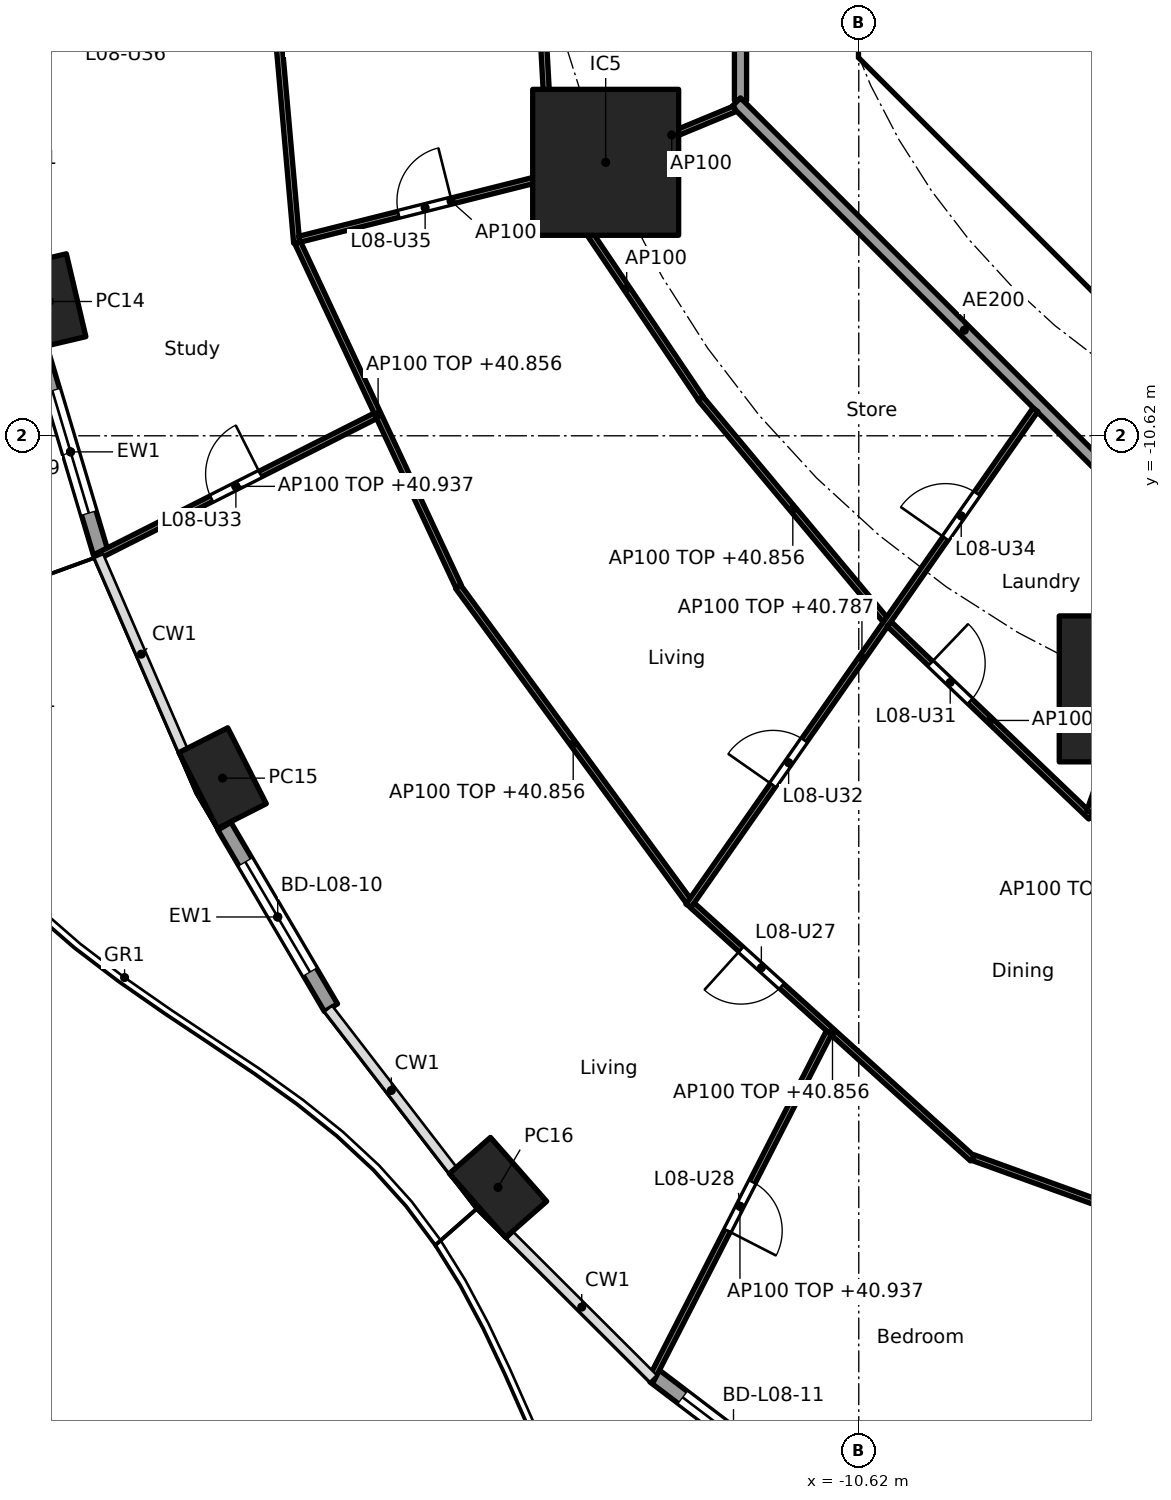
"""IFC4 building model, lengths in metres.
Left out: names, types, materials, properties, quantities, classifications, styles, units other than length and angle.
Written with IfcOpenShell. Run it as: python <this file> out.ifc"""

import sys

from ifc_helpers import new_model, si_unit, direction, frame, frame_2d, origin, origin_2d, place, context, subcontext, project, spatial, polyline, rectangle, hollow_rectangle, outline, extrude, element, fill, save


model = new_model("IFC4")
c1 = context("Model", 3, precision=1e-05, world=origin(), true_north=direction((0.0, 1.0)))
c2 = subcontext(c1, "Body", "Model", "MODEL_VIEW")
j1 = project(units=[si_unit("LENGTHUNIT", "METRE"), si_unit("PLANEANGLEUNIT", "RADIAN")], contexts=[c1])
p1 = place(None, origin())
s1 = spatial("IfcSite", under=j1, at=p1, CompositionType="ELEMENT")
p2 = place(p1, origin())
s2 = spatial("IfcBuilding", under=s1, at=p2, CompositionType="ELEMENT")
p3 = place(p2, frame((0.0, 0.0, 38.1)))
s3 = spatial("IfcBuildingStorey", under=s2, at=p3, CompositionType="ELEMENT", Elevation=38.1)
for number, where, z_axis, x_axis in (
    (1, (-23.929, -8.412, 0.0), (0.0, 0.0, 1.0), (0.229, -0.973, 0.0)),
    (2, (-21.082, -16.25, 0.0), (0.0, 0.0, 1.0), (0.452, -0.892, 0.0)),
    (3, (-16.552, -22.981, 0.0), (0.0, 0.0, 1.0), (0.66, -0.751, 0.0)),
):
    element("IfcColumn", number, at=place(p3, frame(where, z_axis=z_axis, x_axis=x_axis)), inside=s3, PredefinedType="COLUMN", context=c2, shape_type="SweptSolid", body=[
        extrude(hollow_rectangle(XDim=1.4, YDim=0.9, WallThickness=0.05, at=origin_2d()), origin(), (0.0, 0.0, 1.0), 3.7),
    ])
for number, where, z_axis, x_axis in (
    (4, (-14.782, -6.123, 0.0), (0.0, 0.0, 1.0), (1.0, 0.0, 0.0)),
    (5, (-6.123, -14.782, 0.0), (0.0, 0.0, 1.0), (1.0, 0.0, 0.0)),
):
    element("IfcColumn", number, at=place(p3, frame(where, z_axis=z_axis, x_axis=x_axis)), inside=s3, PredefinedType="COLUMN", context=c2, shape_type="SweptSolid", body=[
        extrude(rectangle(XDim=2.4, YDim=2.4, at=origin_2d()), origin(), (0.0, 0.0, 1.0), 3.7),
    ])
p4 = place(p3, frame((-23.073, -12.593, 0.0), z_axis=(0.0, 0.0, 1.0), x_axis=(-0.285871309426, 0.958268018065, 0.0)))
e6 = element("IfcWall", 6, at=p4, inside=s3, PredefinedType="SOLIDWALL", context=c2, shape_type="SweptSolid", body=[
    extrude(rectangle(XDim=3.565, YDim=0.25, at=frame_2d((1.783, 0.0))), origin(), (0.0, 0.0, 1.0), 3.44),
])
p5 = place(p4, frame((0.733, 0.0, 0.0)))
e7 = element("IfcOpeningElement", 7, at=p5, cuts=e6, PredefinedType="OPENING", context=c2, shape_type="SweptSolid", body=[
    extrude(rectangle(XDim=2.1, YDim=2.4, at=frame_2d((1.05, 1.2))), frame((0.0, 0.135, 0.0), z_axis=(0.0, -1.0, 0.0), x_axis=(1.0, 0.0, 0.0)), (0.0, 0.0, 1.0), 0.27),
])
p6 = place(p3, frame((-19.3, -20.026, 0.0), z_axis=(0.0, 0.0, 1.0), x_axis=(-0.506311160839, 0.862350861546, 0.0)))
e8 = element("IfcWall", 8, at=p6, inside=s3, PredefinedType="SOLIDWALL", context=c2, shape_type="SweptSolid", body=[
    extrude(rectangle(XDim=3.462, YDim=0.25, at=frame_2d((1.731, 0.0))), origin(), (0.0, 0.0, 1.0), 3.44),
])
p7 = place(p6, frame((0.681, 0.0, 0.0)))
e9 = element("IfcOpeningElement", 9, at=p7, cuts=e8, PredefinedType="OPENING", context=c2, shape_type="SweptSolid", body=[
    extrude(rectangle(XDim=2.1, YDim=2.4, at=frame_2d((1.05, 1.2))), frame((0.0, 0.135, 0.0), z_axis=(0.0, -1.0, 0.0), x_axis=(1.0, 0.0, 0.0)), (0.0, 0.0, 1.0), 0.27),
])
p8 = place(p3, frame((-11.382, -28.056, 0.0), z_axis=(0.0, 0.0, 1.0), x_axis=(-0.796022293214, 0.605267303517, 0.0)))
e10 = element("IfcWall", 10, at=p8, inside=s3, PredefinedType="SOLIDWALL", context=c2, shape_type="SweptSolid", body=[
    extrude(rectangle(XDim=3.262, YDim=0.25, at=frame_2d((1.631, 0.0))), origin(), (0.0, 0.0, 1.0), 3.44),
])
p9 = place(p8, frame((0.581, 0.0, 0.0)))
e11 = element("IfcOpeningElement", 11, at=p9, cuts=e10, PredefinedType="OPENING", context=c2, shape_type="SweptSolid", body=[
    extrude(rectangle(XDim=2.1, YDim=2.4, at=frame_2d((1.05, 1.2))), frame((0.0, 0.135, 0.0), z_axis=(0.0, -1.0, 0.0), x_axis=(1.0, 0.0, 0.0)), (0.0, 0.0, 1.0), 0.27),
])
p10 = place(p3, frame((-9.988, -4.613, 0.0), z_axis=(0.0, 0.0, 1.0), x_axis=(0.707106781187, -0.707106781187, 0.0)))
e12 = element("IfcWall", 12, at=p10, inside=s3, PredefinedType="SHEAR", context=c2, shape_type="SweptSolid", body=[
    extrude(rectangle(XDim=7.602, YDim=0.6, at=frame_2d((3.801, 0.0))), origin(), (0.0, 0.0, 1.0), 3.44),
])
p11 = place(p10, frame((6.151, 0.0, 0.0)))
e13 = element("IfcOpeningElement", 13, at=p11, cuts=e12, PredefinedType="OPENING", context=c2, shape_type="SweptSolid", body=[
    extrude(rectangle(XDim=1.1, YDim=2.1, at=frame_2d((0.55, 1.05))), frame((0.0, 0.31, 0.0), z_axis=(0.0, -1.0, 0.0), x_axis=(1.0, 0.0, 0.0)), (0.0, 0.0, 1.0), 0.62),
])
p12 = place(p3, origin())
e14 = element("IfcWall", 14, at=p12, inside=s3, PredefinedType="SHEAR", context=c2, shape_type="SweptSolid", body=[
    extrude(outline(polyline([(-10.625, -3.801), (-10.025, -3.801), (-10.025, -4.152), (-9.776, -4.401), (-10.2, -4.825), (-10.625, -4.401), (-10.625, -3.801)])), origin(), (0.0, 0.0, 1.0), 3.44),
])
p13 = place(p3, frame((-8.301, -5.8, 0.0), z_axis=(0.0, 0.0, 1.0), x_axis=(1.0, 0.0, 0.0)))
e15 = element("IfcWall", 15, at=p13, inside=s3, PredefinedType="PARTITIONING", context=c2, shape_type="SweptSolid", body=[
    extrude(rectangle(XDim=2.026, YDim=0.15, at=frame_2d((1.013, 0.0))), origin(), (0.0, 0.0, 1.0), 3.44),
])
p14 = place(p3, frame((-12.565, 5.304, 0.0), z_axis=(0.0, 0.0, 1.0), x_axis=(0.0, -1.0, 0.0)))
e16 = element("IfcWall", 16, at=p14, inside=s3, PredefinedType="PARTITIONING", context=c2, shape_type="SweptSolid", body=[
    extrude(rectangle(XDim=10.409, YDim=0.2, at=frame_2d((5.205, 0.0))), origin(), (0.0, 0.0, 1.0), 3.44),
])
p15 = place(p3, frame((-12.635, -5.134, 0.0), z_axis=(0.0, 0.0, 1.0), x_axis=(0.707106781187, -0.707106781187, 0.0)))
e17 = element("IfcWall", 17, at=p15, inside=s3, PredefinedType="PARTITIONING", context=c2, shape_type="SweptSolid", body=[
    extrude(rectangle(XDim=10.609, YDim=0.2, at=frame_2d((5.305, 0.0))), origin(), (0.0, 0.0, 1.0), 3.44),
])
p16 = place(p3, frame((-16.033, 0.05, 0.0), z_axis=(0.0, 0.0, 1.0), x_axis=(0.054634315779, -0.998506430395, 0.0)))
e18 = element("IfcWall", 18, at=p16, inside=s3, PredefinedType="PARTITIONING", context=c2, shape_type="SweptSolid", body=[
    extrude(rectangle(XDim=6.359, YDim=0.1, at=frame_2d((3.179, 0.0))), origin(), (0.0, 0.0, 1.0), 2.756),
])
p17 = place(p16, frame((2.754, 0.0, 0.0)))
e19 = element("IfcOpeningElement", 19, at=p17, cuts=e18, PredefinedType="OPENING", context=c2, shape_type="SweptSolid", body=[
    extrude(rectangle(XDim=0.9, YDim=2.1, at=frame_2d((0.45, 1.05))), frame((0.0, 0.06, 0.0), z_axis=(0.0, -1.0, 0.0), x_axis=(1.0, 0.0, 0.0)), (0.0, 0.0, 1.0), 0.12),
])
p18 = place(p3, frame((-20.527, 0.05, 0.0), z_axis=(0.0, 0.0, 1.0), x_axis=(0.088135127406, -0.996108527881, 0.0)))
e20 = element("IfcWall", 20, at=p18, inside=s3, PredefinedType="PARTITIONING", context=c2, shape_type="SweptSolid", body=[
    extrude(rectangle(XDim=7.529, YDim=0.1, at=frame_2d((3.765, 0.0))), origin(), (0.0, 0.0, 1.0), 2.756),
])
p19 = place(p3, frame((-20.245, -3.706, 0.0), z_axis=(0.0, 0.0, 1.0), x_axis=(-0.992575966227, -0.121626277047, 0.0)))
e21 = element("IfcWall", 21, at=p19, inside=s3, PredefinedType="PARTITIONING", context=c2, shape_type="SweptSolid", body=[
    extrude(rectangle(XDim=4.904, YDim=0.1, at=frame_2d((2.452, 0.0))), origin(), (0.0, 0.0, 1.0), 2.837),
])
p20 = place(p19, frame((2.002, 0.0, 0.0)))
e22 = element("IfcOpeningElement", 22, at=p20, cuts=e21, PredefinedType="OPENING", context=c2, shape_type="SweptSolid", body=[
    extrude(rectangle(XDim=0.9, YDim=2.1, at=frame_2d((0.45, 1.05))), frame((0.0, 0.06, 0.0), z_axis=(0.0, -1.0, 0.0), x_axis=(1.0, 0.0, 0.0)), (0.0, 0.0, 1.0), 0.12),
])
p21 = place(p3, frame((-12.657, -5.243, 0.0), z_axis=(0.0, 0.0, 1.0), x_axis=(-0.923864733477, -0.382719158442, 0.0)))
e23 = element("IfcWall", 23, at=p21, inside=s3, PredefinedType="PARTITIONING", context=c2, shape_type="SweptSolid", body=[
    extrude(rectangle(XDim=2.25, YDim=0.1, at=frame_2d((1.125, 0.0))), origin(), (0.0, 0.0, 1.0), 3.44),
])
p22 = place(p3, frame((-14.831, -6.135, 0.0), z_axis=(0.0, 0.0, 1.0), x_axis=(-0.96988230015, -0.243574062362, 0.0)))
e24 = element("IfcWall", 24, at=p22, inside=s3, PredefinedType="PARTITIONING", context=c2, shape_type="SweptSolid", body=[
    extrude(rectangle(XDim=5.144, YDim=0.1, at=frame_2d((2.572, 0.0))), origin(), (0.0, 0.0, 1.0), 3.44),
])
p23 = place(p22, frame((2.561, 0.0, 0.0)))
e25 = element("IfcOpeningElement", 25, at=p23, cuts=e24, PredefinedType="OPENING", context=c2, shape_type="SweptSolid", body=[
    extrude(rectangle(XDim=0.9, YDim=2.1, at=frame_2d((0.45, 1.05))), frame((0.0, 0.06, 0.0), z_axis=(0.0, -1.0, 0.0), x_axis=(1.0, 0.0, 0.0)), (0.0, 0.0, 1.0), 0.12),
])
p24 = place(p3, frame((-15.655, -6.391, 0.0), z_axis=(0.0, 0.0, 1.0), x_axis=(0.559126445155, -0.82908239538, 0.0)))
e26 = element("IfcWall", 26, at=p24, inside=s3, PredefinedType="PARTITIONING", context=c2, shape_type="SweptSolid", body=[
    extrude(rectangle(XDim=4.358, YDim=0.1, at=frame_2d((2.179, 0.0))), origin(), (0.0, 0.0, 1.0), 3.44),
])
p25 = place(p3, frame((-19.847, -7.445, 0.0), z_axis=(0.0, 0.0, 1.0), x_axis=(0.423892287987, -0.905712607942, 0.0)))
e27 = element("IfcWall", 27, at=p25, inside=s3, PredefinedType="PARTITIONING", context=c2, shape_type="SweptSolid", body=[
    extrude(rectangle(XDim=6.238, YDim=0.1, at=frame_2d((3.119, 0.0))), origin(), (0.0, 0.0, 1.0), 2.756),
])
p26 = place(p3, frame((-18.569, -10.292, 0.0), z_axis=(0.0, 0.0, 1.0), x_axis=(-0.892519131357, -0.451009534446, 0.0)))
e28 = element("IfcWall", 28, at=p26, inside=s3, PredefinedType="PARTITIONING", context=c2, shape_type="SweptSolid", body=[
    extrude(rectangle(XDim=5.14, YDim=0.1, at=frame_2d((2.57, 0.0))), origin(), (0.0, 0.0, 1.0), 2.837),
])
p27 = place(p26, frame((2.12, 0.0, 0.0)))
e29 = element("IfcOpeningElement", 29, at=p27, cuts=e28, PredefinedType="OPENING", context=c2, shape_type="SweptSolid", body=[
    extrude(rectangle(XDim=0.9, YDim=2.1, at=frame_2d((0.45, 1.05))), frame((0.0, 0.06, 0.0), z_axis=(0.0, -1.0, 0.0), x_axis=(1.0, 0.0, 0.0)), (0.0, 0.0, 1.0), 0.12),
])
p28 = place(p3, frame((-13.222, -10.007, 0.0), z_axis=(0.0, 0.0, 1.0), x_axis=(0.640807748916, -0.767701393075, 0.0)))
e30 = element("IfcWall", 30, at=p28, inside=s3, PredefinedType="PARTITIONING", context=c2, shape_type="SweptSolid", body=[
    extrude(rectangle(XDim=4.737, YDim=0.1, at=frame_2d((2.368, 0.0))), origin(), (0.0, 0.0, 1.0), 2.756),
])
p29 = place(p3, frame((-17.211, -13.1, 0.0), z_axis=(0.0, 0.0, 1.0), x_axis=(0.591206785834, -0.806520016109, 0.0)))
e31 = element("IfcWall", 31, at=p29, inside=s3, PredefinedType="PARTITIONING", context=c2, shape_type="SweptSolid", body=[
    extrude(rectangle(XDim=6.41, YDim=0.1, at=frame_2d((3.205, 0.0))), origin(), (0.0, 0.0, 1.0), 2.756),
])
p30 = place(p3, frame((-7.715, -10.193, 0.0), z_axis=(0.0, 0.0, 1.0), x_axis=(-0.573126502256, -0.819466907454, 0.0)))
e32 = element("IfcWall", 32, at=p30, inside=s3, PredefinedType="PARTITIONING", context=c2, shape_type="SweptSolid", body=[
    extrude(rectangle(XDim=9.954, YDim=0.1, at=frame_2d((4.977, 0.0))), origin(), (0.0, 0.0, 1.0), 2.687),
])
p31 = place(p30, frame((6.631, 0.0, 0.0)))
e33 = element("IfcOpeningElement", 33, at=p31, cuts=e32, PredefinedType="OPENING", context=c2, shape_type="SweptSolid", body=[
    extrude(rectangle(XDim=0.9, YDim=2.1, at=frame_2d((0.45, 1.05))), frame((0.0, 0.06, 0.0), z_axis=(0.0, -1.0, 0.0), x_axis=(1.0, 0.0, 0.0)), (0.0, 0.0, 1.0), 0.12),
])
p32 = place(p30, frame((1.678, 0.0, 0.0)))
e34 = element("IfcOpeningElement", 34, at=p32, cuts=e32, PredefinedType="OPENING", context=c2, shape_type="SweptSolid", body=[
    extrude(rectangle(XDim=0.9, YDim=2.1, at=frame_2d((0.45, 1.05))), frame((0.0, 0.06, 0.0), z_axis=(0.0, -1.0, 0.0), x_axis=(1.0, 0.0, 0.0)), (0.0, 0.0, 1.0), 0.12),
])
p33 = place(p3, frame((-10.119, -13.716, 0.0), z_axis=(0.0, 0.0, 1.0), x_axis=(0.722763212502, -0.69109575216, 0.0)))
e35 = element("IfcWall", 35, at=p33, inside=s3, PredefinedType="PARTITIONING", context=c2, shape_type="SweptSolid", body=[
    extrude(rectangle(XDim=4.587, YDim=0.1, at=frame_2d((2.293, 0.0))), origin(), (0.0, 0.0, 1.0), 2.756),
])
p34 = place(p33, frame((0.938, 0.0, 0.0)))
e36 = element("IfcOpeningElement", 36, at=p34, cuts=e35, PredefinedType="OPENING", context=c2, shape_type="SweptSolid", body=[
    extrude(rectangle(XDim=0.9, YDim=2.1, at=frame_2d((0.45, 1.05))), frame((0.0, 0.06, 0.0), z_axis=(0.0, -1.0, 0.0), x_axis=(1.0, 0.0, 0.0)), (0.0, 0.0, 1.0), 0.12),
])
p35 = place(p3, frame((-13.355, -18.343, 0.0), z_axis=(0.0, 0.0, 1.0), x_axis=(0.741720189244, -0.670709445936, 0.0)))
e37 = element("IfcWall", 37, at=p35, inside=s3, PredefinedType="PARTITIONING", context=c2, shape_type="SweptSolid", body=[
    extrude(rectangle(XDim=6.209, YDim=0.1, at=frame_2d((3.104, 0.0))), origin(), (0.0, 0.0, 1.0), 2.756),
])
p36 = place(p35, frame((1.077, 0.0, 0.0)))
e38 = element("IfcOpeningElement", 38, at=p36, cuts=e37, PredefinedType="OPENING", context=c2, shape_type="SweptSolid", body=[
    extrude(rectangle(XDim=0.9, YDim=2.1, at=frame_2d((0.45, 1.05))), frame((0.0, 0.06, 0.0), z_axis=(0.0, -1.0, 0.0), x_axis=(1.0, 0.0, 0.0)), (0.0, 0.0, 1.0), 0.12),
])
p37 = place(p3, frame((-11.112, -20.437, 0.0), z_axis=(0.0, 0.0, 1.0), x_axis=(-0.455901610863, -0.890030179945, 0.0)))
e39 = element("IfcWall", 39, at=p37, inside=s3, PredefinedType="PARTITIONING", context=c2, shape_type="SweptSolid", body=[
    extrude(rectangle(XDim=6.414, YDim=0.1, at=frame_2d((3.207, 0.0))), origin(), (0.0, 0.0, 1.0), 2.837),
])
p38 = place(p37, frame((2.757, 0.0, 0.0)))
e40 = element("IfcOpeningElement", 40, at=p38, cuts=e39, PredefinedType="OPENING", context=c2, shape_type="SweptSolid", body=[
    extrude(rectangle(XDim=0.9, YDim=2.1, at=frame_2d((0.45, 1.05))), frame((0.0, 0.06, 0.0), z_axis=(0.0, -1.0, 0.0), x_axis=(1.0, 0.0, 0.0)), (0.0, 0.0, 1.0), 0.12),
])
p39 = place(p3, frame((-6.139, -14.83, 0.0), z_axis=(0.0, 0.0, 1.0), x_axis=(-0.327246993321, -0.944938836837, 0.0)))
e41 = element("IfcWall", 41, at=p39, inside=s3, PredefinedType="PARTITIONING", context=c2, shape_type="SweptSolid", body=[
    extrude(rectangle(XDim=2.09, YDim=0.1, at=frame_2d((1.045, 0.0))), origin(), (0.0, 0.0, 1.0), 3.44),
])
p40 = place(p3, frame((-6.791, -16.862, 0.0), z_axis=(0.0, 0.0, 1.0), x_axis=(0.979581941859, -0.201045316246, 0.0)))
e42 = element("IfcWall", 42, at=p40, inside=s3, PredefinedType="PARTITIONING", context=c2, shape_type="SweptSolid", body=[
    extrude(rectangle(XDim=2.256, YDim=0.1, at=frame_2d((1.128, 0.0))), origin(), (0.0, 0.0, 1.0), 2.756),
])
p41 = place(p3, frame((-8.739, -22.491, 0.0), z_axis=(0.0, 0.0, 1.0), x_axis=(0.940401691072, -0.340065669288, 0.0)))
e43 = element("IfcWall", 43, at=p41, inside=s3, PredefinedType="PARTITIONING", context=c2, shape_type="SweptSolid", body=[
    extrude(rectangle(XDim=6.067, YDim=0.1, at=frame_2d((3.034, 0.0))), origin(), (0.0, 0.0, 1.0), 2.756),
])
p42 = place(p41, frame((4.05, 0.0, 0.0)))
e44 = element("IfcOpeningElement", 44, at=p42, cuts=e43, PredefinedType="OPENING", context=c2, shape_type="SweptSolid", body=[
    extrude(rectangle(XDim=0.9, YDim=2.1, at=frame_2d((0.45, 1.05))), frame((0.0, 0.06, 0.0), z_axis=(0.0, -1.0, 0.0), x_axis=(1.0, 0.0, 0.0)), (0.0, 0.0, 1.0), 0.12),
])
p43 = place(p3, frame((-3.492, -12.662, 0.0), z_axis=(0.0, 0.0, 1.0), x_axis=(-0.219268088006, -0.975664648115, 0.0)))
e45 = element("IfcWall", 45, at=p43, inside=s3, PredefinedType="PARTITIONING", context=c2, shape_type="SweptSolid", body=[
    extrude(rectangle(XDim=18.23, YDim=0.1, at=frame_2d((9.115, 0.0))), origin(), (0.0, 0.0, 1.0), 2.687),
])
p44 = place(p43, frame((0.35, 0.0, 0.0)))
e46 = element("IfcOpeningElement", 46, at=p44, cuts=e45, PredefinedType="OPENING", context=c2, shape_type="SweptSolid", body=[
    extrude(rectangle(XDim=0.9, YDim=2.1, at=frame_2d((0.45, 1.05))), frame((0.0, 0.06, 0.0), z_axis=(0.0, -1.0, 0.0), x_axis=(1.0, 0.0, 0.0)), (0.0, 0.0, 1.0), 0.12),
])
p45 = place(p43, frame((7.497, 0.0, 0.0)))
e47 = element("IfcOpeningElement", 47, at=p45, cuts=e45, PredefinedType="OPENING", context=c2, shape_type="SweptSolid", body=[
    extrude(rectangle(XDim=0.9, YDim=2.1, at=frame_2d((0.45, 1.05))), frame((0.0, 0.06, 0.0), z_axis=(0.0, -1.0, 0.0), x_axis=(1.0, 0.0, 0.0)), (0.0, 0.0, 1.0), 0.12),
])
p46 = place(p5, origin())
e48 = element("IfcDoor", 48, at=p46, inside=s3, OperationType="SLIDING_TO_LEFT", PredefinedType="DOOR", context=c2, shape_type="SweptSolid", body=[
    extrude(rectangle(XDim=2.1, YDim=2.4, at=frame_2d((1.05, 1.2))), frame((0.0, 0.025, 0.0), z_axis=(0.0, -1.0, 0.0), x_axis=(1.0, 0.0, 0.0)), (0.0, 0.0, 1.0), 0.05),
])
fill(e7, e48)
p47 = place(p7, origin())
e49 = element("IfcDoor", 49, at=p47, inside=s3, OperationType="SLIDING_TO_LEFT", PredefinedType="DOOR", context=c2, shape_type="SweptSolid", body=[
    extrude(rectangle(XDim=2.1, YDim=2.4, at=frame_2d((1.05, 1.2))), frame((0.0, 0.025, 0.0), z_axis=(0.0, -1.0, 0.0), x_axis=(1.0, 0.0, 0.0)), (0.0, 0.0, 1.0), 0.05),
])
fill(e9, e49)
p48 = place(p9, origin())
e50 = element("IfcDoor", 50, at=p48, inside=s3, OperationType="SLIDING_TO_LEFT", PredefinedType="DOOR", context=c2, shape_type="SweptSolid", body=[
    extrude(rectangle(XDim=2.1, YDim=2.4, at=frame_2d((1.05, 1.2))), frame((0.0, 0.025, 0.0), z_axis=(0.0, -1.0, 0.0), x_axis=(1.0, 0.0, 0.0)), (0.0, 0.0, 1.0), 0.05),
])
fill(e11, e50)
p49 = place(p36, frame((0.9, 0.0, 0.0), x_axis=(-1.0, 0.0, 0.0)))
e51 = element("IfcDoor", 51, at=p49, inside=s3, OperationType="SINGLE_SWING_RIGHT", PredefinedType="DOOR", context=c2, shape_type="SweptSolid", body=[
    extrude(rectangle(XDim=0.9, YDim=2.1, at=frame_2d((0.45, 1.05))), frame((0.0, 0.025, 0.0), z_axis=(0.0, -1.0, 0.0), x_axis=(1.0, 0.0, 0.0)), (0.0, 0.0, 1.0), 0.05),
])
fill(e38, e51)
p50 = place(p38, origin())
e52 = element("IfcDoor", 52, at=p50, inside=s3, OperationType="SINGLE_SWING_RIGHT", PredefinedType="DOOR", context=c2, shape_type="SweptSolid", body=[
    extrude(rectangle(XDim=0.9, YDim=2.1, at=frame_2d((0.45, 1.05))), frame((0.0, 0.025, 0.0), z_axis=(0.0, -1.0, 0.0), x_axis=(1.0, 0.0, 0.0)), (0.0, 0.0, 1.0), 0.05),
])
fill(e40, e52)
p51 = place(p34, origin())
e53 = element("IfcDoor", 53, at=p51, inside=s3, OperationType="SINGLE_SWING_LEFT", PredefinedType="DOOR", context=c2, shape_type="SweptSolid", body=[
    extrude(rectangle(XDim=0.9, YDim=2.1, at=frame_2d((0.45, 1.05))), frame((0.0, 0.025, 0.0), z_axis=(0.0, -1.0, 0.0), x_axis=(1.0, 0.0, 0.0)), (0.0, 0.0, 1.0), 0.05),
])
fill(e36, e53)
p52 = place(p31, frame((0.9, 0.0, 0.0), x_axis=(-1.0, 0.0, 0.0)))
e54 = element("IfcDoor", 54, at=p52, inside=s3, OperationType="SINGLE_SWING_LEFT", PredefinedType="DOOR", context=c2, shape_type="SweptSolid", body=[
    extrude(rectangle(XDim=0.9, YDim=2.1, at=frame_2d((0.45, 1.05))), frame((0.0, 0.025, 0.0), z_axis=(0.0, -1.0, 0.0), x_axis=(1.0, 0.0, 0.0)), (0.0, 0.0, 1.0), 0.05),
])
fill(e33, e54)
p53 = place(p27, frame((0.9, 0.0, 0.0), x_axis=(-1.0, 0.0, 0.0)))
e55 = element("IfcDoor", 55, at=p53, inside=s3, OperationType="SINGLE_SWING_RIGHT", PredefinedType="DOOR", context=c2, shape_type="SweptSolid", body=[
    extrude(rectangle(XDim=0.9, YDim=2.1, at=frame_2d((0.45, 1.05))), frame((0.0, 0.025, 0.0), z_axis=(0.0, -1.0, 0.0), x_axis=(1.0, 0.0, 0.0)), (0.0, 0.0, 1.0), 0.05),
])
fill(e29, e55)
p54 = place(p32, frame((0.9, 0.0, 0.0), x_axis=(-1.0, 0.0, 0.0)))
e56 = element("IfcDoor", 56, at=p54, inside=s3, OperationType="SINGLE_SWING_LEFT", PredefinedType="DOOR", context=c2, shape_type="SweptSolid", body=[
    extrude(rectangle(XDim=0.9, YDim=2.1, at=frame_2d((0.45, 1.05))), frame((0.0, 0.025, 0.0), z_axis=(0.0, -1.0, 0.0), x_axis=(1.0, 0.0, 0.0)), (0.0, 0.0, 1.0), 0.05),
])
fill(e34, e56)
p55 = place(p23, frame((0.9, 0.0, 0.0), x_axis=(-1.0, 0.0, 0.0)))
e57 = element("IfcDoor", 57, at=p55, inside=s3, OperationType="SINGLE_SWING_RIGHT", PredefinedType="DOOR", context=c2, shape_type="SweptSolid", body=[
    extrude(rectangle(XDim=0.9, YDim=2.1, at=frame_2d((0.45, 1.05))), frame((0.0, 0.025, 0.0), z_axis=(0.0, -1.0, 0.0), x_axis=(1.0, 0.0, 0.0)), (0.0, 0.0, 1.0), 0.05),
])
fill(e25, e57)
save(model, sys.argv[1])
